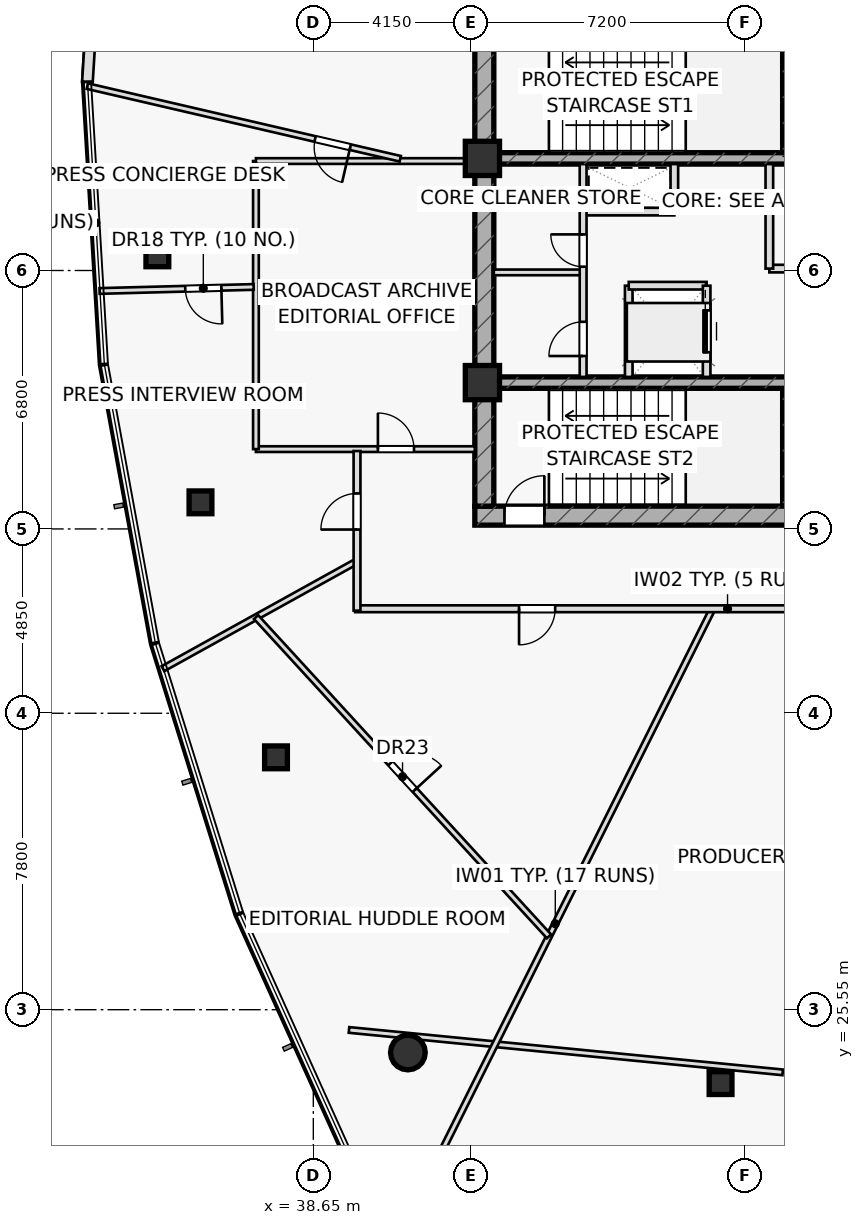
"""IFC4 building model, lengths in metres.
Left out: names, types, materials, properties, quantities, classifications, styles, units other than length and angle.
Written with IfcOpenShell. Run it as: python <this file> out.ifc"""

import sys

from ifc_helpers import new_model, si_unit, direction, frame, frame_2d, origin, origin_2d, place, context, subcontext, project, spatial, rectangle, hollow_rectangle, hollow_circle, extrude, element, fill, save


model = new_model("IFC4")
c1 = context("Model", 3, precision=1e-05, world=origin(), true_north=direction((0.0, 1.0)))
c2 = subcontext(c1, "Body", "Model", "MODEL_VIEW")
j1 = project(units=[si_unit("LENGTHUNIT", "METRE"), si_unit("PLANEANGLEUNIT", "RADIAN")], contexts=[c1])
p1 = place(None, origin())
s1 = spatial("IfcSite", under=j1, at=p1, CompositionType="ELEMENT")
p2 = place(p1, origin())
s2 = spatial("IfcBuilding", under=s1, at=p2, CompositionType="ELEMENT")
p3 = place(p2, frame((0.0, 0.0, 188.75)))
s3 = spatial("IfcBuildingStorey", under=s2, at=p3, CompositionType="ELEMENT", Elevation=188.75)
for number, where, z_axis, x_axis in (
    (1, (51.11, 48.1, 0.0), (0.0, 0.0, 1.0), (0.0, 1.0, 0.0)),
    (2, (51.11, 38.8, 0.0), (0.0, 0.0, 1.0), (0.0, 1.0, 0.0)),
):
    element("IfcWall", number, at=place(p3, frame(where, z_axis=z_axis, x_axis=x_axis)), inside=s3, PredefinedType="SHEAR", context=c2, shape_type="SweptSolid", body=[
        extrude(rectangle(XDim=3.1, YDim=0.22, at=frame_2d((1.55, 0.0))), origin(), (0.0, 0.0, 1.0), 3.55),
    ])
p4 = place(p3, frame((42.9, 38.55, 0.0), z_axis=(0.0, 0.0, 1.0), x_axis=(1.0, 0.0, 0.0)))
e3 = element("IfcWall", 3, at=p4, inside=s3, PredefinedType="SHEAR", context=c2, shape_type="SweptSolid", body=[
    extrude(rectangle(XDim=14.2, YDim=0.5, at=frame_2d((7.1, 0.0))), origin(), (0.0, 0.0, 1.0), 3.55),
])
p5 = place(p4, frame((0.78, 0.0, 0.0)))
e4 = element("IfcOpeningElement", 4, at=p5, cuts=e3, PredefinedType="OPENING", context=c2, shape_type="SweptSolid", body=[
    extrude(rectangle(XDim=1.05, YDim=2.2, at=frame_2d((0.525, 1.1))), frame((0.0, 0.26, 0.0), z_axis=(0.0, -1.0, 0.0), x_axis=(1.0, 0.0, 0.0)), (0.0, 0.0, 1.0), 0.52),
])
p6 = place(p3, frame((43.15, 38.8, 0.0), z_axis=(0.0, 0.0, 1.0), x_axis=(0.0, 1.0, 0.0)))
e5 = element("IfcWall", 5, at=p6, inside=s3, PredefinedType="SHEAR", context=c2, shape_type="SweptSolid", body=[
    extrude(rectangle(XDim=12.4, YDim=0.5, at=frame_2d((6.2, 0.0))), origin(), (0.0, 0.0, 1.0), 3.55),
])
p7 = place(p3, frame((43.4, 47.95, 0.0), z_axis=(0.0, 0.0, 1.0), x_axis=(1.0, 0.0, 0.0)))
e6 = element("IfcWall", 6, at=p7, inside=s3, PredefinedType="SHEAR", context=c2, shape_type="SweptSolid", body=[
    extrude(rectangle(XDim=13.2, YDim=0.3, at=frame_2d((6.6, 0.0))), origin(), (0.0, 0.0, 1.0), 3.55),
])
p8 = place(p7, frame((8.345, 0.0, 0.0)))
e7 = element("IfcOpeningElement", 7, at=p8, cuts=e6, PredefinedType="OPENING", context=c2, shape_type="SweptSolid", body=[
    extrude(rectangle(XDim=1.15, YDim=2.2, at=frame_2d((0.575, 1.1))), frame((0.0, 0.16, 0.0), z_axis=(0.0, -1.0, 0.0), x_axis=(1.0, 0.0, 0.0)), (0.0, 0.0, 1.0), 0.32),
])
p9 = place(p7, frame((10.065, 0.0, 0.0)))
e8 = element("IfcOpeningElement", 8, at=p9, cuts=e6, PredefinedType="OPENING", context=c2, shape_type="SweptSolid", body=[
    extrude(rectangle(XDim=1.15, YDim=2.2, at=frame_2d((0.575, 1.1))), frame((0.0, 0.16, 0.0), z_axis=(0.0, -1.0, 0.0), x_axis=(1.0, 0.0, 0.0)), (0.0, 0.0, 1.0), 0.32),
])
p10 = place(p7, frame((11.645, 0.0, 0.0)))
e9 = element("IfcOpeningElement", 9, at=p10, cuts=e6, PredefinedType="OPENING", context=c2, shape_type="SweptSolid", body=[
    extrude(rectangle(XDim=1.15, YDim=2.2, at=frame_2d((0.575, 1.1))), frame((0.0, 0.16, 0.0), z_axis=(0.0, -1.0, 0.0), x_axis=(1.0, 0.0, 0.0)), (0.0, 0.0, 1.0), 0.32),
])
p11 = place(p3, frame((43.4, 42.05, 0.0), z_axis=(0.0, 0.0, 1.0), x_axis=(1.0, 0.0, 0.0)))
e10 = element("IfcWall", 10, at=p11, inside=s3, PredefinedType="SHEAR", context=c2, shape_type="SweptSolid", body=[
    extrude(rectangle(XDim=13.2, YDim=0.3, at=frame_2d((6.6, 0.0))), origin(), (0.0, 0.0, 1.0), 3.55),
])
p12 = place(p11, frame((8.37, 0.0, 0.0)))
e11 = element("IfcOpeningElement", 11, at=p12, cuts=e10, PredefinedType="OPENING", context=c2, shape_type="SweptSolid", body=[
    extrude(rectangle(XDim=1.1, YDim=2.15, at=frame_2d((0.55, 1.075))), frame((0.0, 0.16, 0.0), z_axis=(0.0, -1.0, 0.0), x_axis=(1.0, 0.0, 0.0)), (0.0, 0.0, 1.0), 0.32),
])
p13 = place(p11, frame((10.09, 0.0, 0.0)))
e12 = element("IfcOpeningElement", 12, at=p13, cuts=e10, PredefinedType="OPENING", context=c2, shape_type="SweptSolid", body=[
    extrude(rectangle(XDim=1.1, YDim=2.15, at=frame_2d((0.55, 1.075))), frame((0.0, 0.16, 0.0), z_axis=(0.0, -1.0, 0.0), x_axis=(1.0, 0.0, 0.0)), (0.0, 0.0, 1.0), 0.32),
])
p14 = place(p11, frame((11.83, 0.0, 0.0)))
e13 = element("IfcOpeningElement", 13, at=p14, cuts=e10, PredefinedType="OPENING", context=c2, shape_type="SweptSolid", body=[
    extrude(rectangle(XDim=1.1, YDim=2.15, at=frame_2d((0.55, 1.075))), frame((0.0, 0.16, 0.0), z_axis=(0.0, -1.0, 0.0), x_axis=(1.0, 0.0, 0.0)), (0.0, 0.0, 1.0), 0.32),
])
for number, where, z_axis, x_axis in (
    (14, (43.1, 47.95, 0.0), (0.0, 0.0, 1.0), (1.0, 0.0, 0.0)),
    (15, (43.1, 42.05, 0.0), (0.0, 0.0, 1.0), (1.0, 0.0, 0.0)),
):
    element("IfcColumn", number, at=place(p3, frame(where, z_axis=z_axis, x_axis=x_axis)), inside=s3, PredefinedType="COLUMN", context=c2, shape_type="SweptSolid", body=[
        extrude(rectangle(XDim=0.9, YDim=0.9, at=origin_2d()), origin(), (0.0, 0.0, 1.0), 3.55),
    ])
for number, where, z_axis, x_axis in (
    (16, (34.546, 45.399, 0.0), (0.0, 0.0, 1.0), (1.0, 0.0, 0.0)),
    (17, (35.681, 38.9, 0.0), (0.0, 0.0, 1.0), (1.0, 0.0, 0.0)),
    (18, (37.668, 32.19, 0.0), (0.0, 0.0, 1.0), (1.0, 0.0, 0.0)),
):
    element("IfcColumn", number, at=place(p3, frame(where, z_axis=z_axis, x_axis=x_axis)), inside=s3, PredefinedType="COLUMN", context=c2, shape_type="SweptSolid", body=[
        extrude(hollow_rectangle(XDim=0.6, YDim=0.6, WallThickness=0.036, at=origin_2d()), origin(), (0.0, 0.0, 1.0), 3.55),
    ])
p15 = place(p3, frame((41.139, 24.424, 0.0), z_axis=(0.0, 0.0, 1.0), x_axis=(1.0, 0.0, 0.0)))
e19 = element("IfcColumn", 19, at=p15, inside=s3, PredefinedType="COLUMN", context=c2, shape_type="SweptSolid", body=[
    extrude(hollow_circle(Radius=0.457, WallThickness=0.04, at=origin_2d()), origin(), (0.0, 0.0, 1.0), 3.55),
])
p16 = place(p3, frame((49.366, 23.619, 0.0), z_axis=(0.0, 0.0, 1.0), x_axis=(1.0, 0.0, 0.0)))
e20 = element("IfcColumn", 20, at=p16, inside=s3, PredefinedType="COLUMN", context=c2, shape_type="SweptSolid", body=[
    extrude(hollow_rectangle(XDim=0.6, YDim=0.6, WallThickness=0.036, at=origin_2d()), origin(), (0.0, 0.0, 1.0), 3.55),
])
p17 = place(p3, frame((45.75, 46.55, 0.0), z_axis=(0.0, 0.0, 1.0), x_axis=(1.0, 0.0, 0.0)))
e21 = element("IfcWall", 21, at=p17, inside=s3, PredefinedType="PARTITIONING", context=c2, shape_type="SweptSolid", body=[
    extrude(rectangle(XDim=2.4, YDim=0.2, at=frame_2d((1.2, 0.0))), origin(), (0.0, 0.0, 1.0), 3.55),
])
p18 = place(p3, frame((48.15, 46.55, 0.0), z_axis=(0.0, 0.0, 1.0), x_axis=(0.0, 1.0, 0.0)))
e22 = element("IfcWall", 22, at=p18, inside=s3, PredefinedType="PARTITIONING", context=c2, shape_type="SweptSolid", body=[
    extrude(rectangle(XDim=1.25, YDim=0.2, at=frame_2d((0.625, 0.0))), origin(), (0.0, 0.0, 1.0), 3.55),
])
p19 = place(p3, frame((46.95, 42.2, 0.0), z_axis=(0.0, 0.0, 1.0), x_axis=(0.0, 1.0, 0.0)))
e23 = element("IfcWall", 23, at=p19, inside=s3, PredefinedType="PARTITIONING", context=c2, shape_type="SweptSolid", body=[
    extrude(rectangle(XDim=2.4, YDim=0.2, at=frame_2d((1.2, 0.0))), origin(), (0.0, 0.0, 1.0), 3.55),
])
p20 = place(p3, frame((46.95, 44.6, 0.0), z_axis=(0.0, 0.0, 1.0), x_axis=(1.0, 0.0, 0.0)))
e24 = element("IfcWall", 24, at=p20, inside=s3, PredefinedType="PARTITIONING", context=c2, shape_type="SweptSolid", body=[
    extrude(rectangle(XDim=2.05, YDim=0.2, at=frame_2d((1.025, 0.0))), origin(), (0.0, 0.0, 1.0), 3.55),
])
p21 = place(p3, frame((50.65, 45.05, 0.0), z_axis=(0.0, 0.0, 1.0), x_axis=(1.0, 0.0, 0.0)))
e25 = element("IfcWall", 25, at=p21, inside=s3, PredefinedType="PARTITIONING", context=c2, shape_type="SweptSolid", body=[
    extrude(rectangle(XDim=5.95, YDim=0.2, at=frame_2d((2.975, 0.0))), origin(), (0.0, 0.0, 1.0), 3.55),
])
p22 = place(p21, frame((1.35, 0.0, 0.0)))
e26 = element("IfcOpeningElement", 26, at=p22, cuts=e25, PredefinedType="OPENING", context=c2, shape_type="SweptSolid", body=[
    extrude(rectangle(XDim=1.5, YDim=2.2, at=frame_2d((0.75, 1.1))), frame((0.0, 0.11, 0.0), z_axis=(0.0, -1.0, 0.0), x_axis=(1.0, 0.0, 0.0)), (0.0, 0.0, 1.0), 0.22),
])
p23 = place(p3, frame((50.65, 45.05, 0.0), z_axis=(0.0, 0.0, 1.0), x_axis=(0.0, 1.0, 0.0)))
e27 = element("IfcWall", 27, at=p23, inside=s3, PredefinedType="PARTITIONING", context=c2, shape_type="SweptSolid", body=[
    extrude(rectangle(XDim=2.75, YDim=0.2, at=frame_2d((1.375, 0.0))), origin(), (0.0, 0.0, 1.0), 3.55),
])
p24 = place(p3, frame((43.4, 44.95, 0.0), z_axis=(0.0, 0.0, 1.0), x_axis=(1.0, 0.0, 0.0)))
e28 = element("IfcWall", 28, at=p24, inside=s3, PredefinedType="PARTITIONING", context=c2, shape_type="SweptSolid", body=[
    extrude(rectangle(XDim=2.35, YDim=0.15, at=frame_2d((1.175, 0.0))), origin(), (0.0, 0.0, 1.0), 3.55),
])
p25 = place(p3, frame((45.75, 42.2, 0.0), z_axis=(0.0, 0.0, 1.0), x_axis=(0.0, 1.0, 0.0)))
e29 = element("IfcWall", 29, at=p25, inside=s3, PredefinedType="PARTITIONING", context=c2, shape_type="SweptSolid", body=[
    extrude(rectangle(XDim=5.6, YDim=0.18, at=frame_2d((2.8, 0.0))), origin(), (0.0, 0.0, 1.0), 3.55),
])
p26 = place(p25, frame((0.55, 0.0, 0.0)))
e30 = element("IfcOpeningElement", 30, at=p26, cuts=e29, PredefinedType="OPENING", context=c2, shape_type="SweptSolid", body=[
    extrude(rectangle(XDim=0.9, YDim=2.05, at=frame_2d((0.45, 1.025))), frame((0.0, 0.1, 0.0), z_axis=(0.0, -1.0, 0.0), x_axis=(1.0, 0.0, 0.0)), (0.0, 0.0, 1.0), 0.2),
])
p27 = place(p25, frame((2.9, 0.0, 0.0)))
e31 = element("IfcOpeningElement", 31, at=p27, cuts=e29, PredefinedType="OPENING", context=c2, shape_type="SweptSolid", body=[
    extrude(rectangle(XDim=0.85, YDim=2.05, at=frame_2d((0.425, 1.025))), frame((0.0, 0.1, 0.0), z_axis=(0.0, -1.0, 0.0), x_axis=(1.0, 0.0, 0.0)), (0.0, 0.0, 1.0), 0.2),
])
p28 = place(p3, frame((39.589, 25.018, 0.0), z_axis=(0.0, 0.0, 1.0), x_axis=(0.99524905582, -0.097361783517, 0.0)))
e32 = element("IfcWall", 32, at=p28, inside=s3, PredefinedType="PARTITIONING", context=c2, shape_type="SweptSolid", body=[
    extrude(rectangle(XDim=11.467, YDim=0.15, at=frame_2d((5.733, 0.0))), origin(), (0.0, 0.0, 1.0), 2.935),
])
p29 = place(p3, frame((37.14, 40.3, 0.0), z_axis=(0.0, 0.0, 1.0), x_axis=(1.0, 0.0, 0.0)))
e33 = element("IfcWall", 33, at=p29, inside=s3, PredefinedType="PARTITIONING", context=c2, shape_type="SweptSolid", body=[
    extrude(rectangle(XDim=5.76, YDim=0.15, at=frame_2d((2.88, 0.0))), origin(), (0.0, 0.0, 1.0), 3.55),
])
p30 = place(p29, frame((3.21, 0.0, 0.0)))
e34 = element("IfcOpeningElement", 34, at=p30, cuts=e33, PredefinedType="OPENING", context=c2, shape_type="SweptSolid", body=[
    extrude(rectangle(XDim=0.95, YDim=2.05, at=frame_2d((0.475, 1.025))), frame((0.0, 0.085, 0.0), z_axis=(0.0, -1.0, 0.0), x_axis=(1.0, 0.0, 0.0)), (0.0, 0.0, 1.0), 0.17),
])
p31 = place(p3, frame((37.14, 40.3, 0.0), z_axis=(0.0, 0.0, 1.0), x_axis=(0.0, 1.0, 0.0)))
e35 = element("IfcWall", 35, at=p31, inside=s3, PredefinedType="PARTITIONING", context=c2, shape_type="SweptSolid", body=[
    extrude(rectangle(XDim=7.58, YDim=0.15, at=frame_2d((3.79, 0.0))), origin(), (0.0, 0.0, 1.0), 2.935),
])
p32 = place(p3, frame((37.14, 47.88, 0.0), z_axis=(0.0, 0.0, 1.0), x_axis=(1.0, 0.0, 0.0)))
e36 = element("IfcWall", 36, at=p32, inside=s3, PredefinedType="PARTITIONING", context=c2, shape_type="SweptSolid", body=[
    extrude(rectangle(XDim=5.76, YDim=0.15, at=frame_2d((2.88, 0.0))), origin(), (0.0, 0.0, 1.0), 2.935),
])
p33 = place(p3, frame((37.08, 44.567, 0.0), z_axis=(0.0, 0.0, 1.0), x_axis=(-0.999657078265, -0.026186368123, 0.0)))
e37 = element("IfcWall", 37, at=p33, inside=s3, PredefinedType="PARTITIONING", context=c2, shape_type="SweptSolid", body=[
    extrude(rectangle(XDim=4.056, YDim=0.15, at=frame_2d((2.028, 0.0))), origin(), (0.0, 0.0, 1.0), 3.025),
])
p34 = place(p33, frame((0.85, 0.0, 0.0)))
e38 = element("IfcOpeningElement", 38, at=p34, cuts=e37, PredefinedType="OPENING", context=c2, shape_type="SweptSolid", body=[
    extrude(rectangle(XDim=0.95, YDim=2.05, at=frame_2d((0.475, 1.025))), frame((0.0, 0.085, 0.0), z_axis=(0.0, -1.0, 0.0), x_axis=(1.0, 0.0, 0.0)), (0.0, 0.0, 1.0), 0.17),
])
p35 = place(p3, frame((39.8, 37.352, 0.0), z_axis=(0.0, 0.0, 1.0), x_axis=(-0.874673544056, -0.484712483158, 0.0)))
e39 = element("IfcWall", 39, at=p35, inside=s3, PredefinedType="PARTITIONING", context=c2, shape_type="SweptSolid", body=[
    extrude(rectangle(XDim=5.839, YDim=0.15, at=frame_2d((2.919, 0.0))), origin(), (0.0, 0.0, 1.0), 3.025),
])
p36 = place(p3, frame((49.156, 36.1, 0.0), z_axis=(0.0, 0.0, 1.0), x_axis=(-0.446733908908, -0.894666873552, 0.0)))
e40 = element("IfcWall", 40, at=p36, inside=s3, PredefinedType="PARTITIONING", context=c2, shape_type="SweptSolid", body=[
    extrude(rectangle(XDim=18.529, YDim=0.15, at=frame_2d((9.264, 0.0))), origin(), (0.0, 0.0, 1.0), 2.935),
])
p37 = place(p3, frame((40.937, 47.94, 0.0), z_axis=(0.0, 0.0, 1.0), x_axis=(-0.974086065595, 0.226177666479, 0.0)))
e41 = element("IfcWall", 41, at=p37, inside=s3, PredefinedType="PARTITIONING", context=c2, shape_type="SweptSolid", body=[
    extrude(rectangle(XDim=8.453, YDim=0.15, at=frame_2d((4.227, 0.0))), origin(), (0.0, 0.0, 1.0), 2.935),
])
p38 = place(p37, frame((1.35, 0.0, 0.0)))
e42 = element("IfcOpeningElement", 42, at=p38, cuts=e41, PredefinedType="OPENING", context=c2, shape_type="SweptSolid", body=[
    extrude(rectangle(XDim=0.95, YDim=2.05, at=frame_2d((0.475, 1.025))), frame((0.0, 0.085, 0.0), z_axis=(0.0, -1.0, 0.0), x_axis=(1.0, 0.0, 0.0)), (0.0, 0.0, 1.0), 0.17),
])
p39 = place(p3, frame((37.144, 35.881, 0.0), z_axis=(0.0, 0.0, 1.0), x_axis=(0.676055232475, -0.736850950086, 0.0)))
e43 = element("IfcWall", 43, at=p39, inside=s3, PredefinedType="PARTITIONING", context=c2, shape_type="SweptSolid", body=[
    extrude(rectangle(XDim=11.401, YDim=0.15, at=frame_2d((5.7, 0.0))), origin(), (0.0, 0.0, 1.0), 2.935),
])
p40 = place(p39, frame((5.225, 0.0, 0.0)))
e44 = element("IfcOpeningElement", 44, at=p40, cuts=e43, PredefinedType="OPENING", context=c2, shape_type="SweptSolid", body=[
    extrude(rectangle(XDim=0.95, YDim=2.05, at=frame_2d((0.475, 1.025))), frame((0.0, 0.085, 0.0), z_axis=(0.0, -1.0, 0.0), x_axis=(1.0, 0.0, 0.0)), (0.0, 0.0, 1.0), 0.17),
])
p41 = place(p3, frame((59.35, 36.1, 0.0), z_axis=(0.0, 0.0, 1.0), x_axis=(-1.0, 0.0, 0.0)))
e45 = element("IfcWall", 45, at=p41, inside=s3, PredefinedType="PARTITIONING", context=c2, shape_type="SweptSolid", body=[
    extrude(rectangle(XDim=19.6, YDim=0.18, at=frame_2d((9.8, 0.0))), origin(), (0.0, 0.0, 1.0), 2.935),
])
p42 = place(p41, frame((1.042, 0.0, 0.0)))
e46 = element("IfcOpeningElement", 46, at=p42, cuts=e45, PredefinedType="OPENING", context=c2, shape_type="SweptSolid", body=[
    extrude(rectangle(XDim=0.95, YDim=2.05, at=frame_2d((0.475, 1.025))), frame((0.0, 0.1, 0.0), z_axis=(0.0, -1.0, 0.0), x_axis=(1.0, 0.0, 0.0)), (0.0, 0.0, 1.0), 0.2),
])
p43 = place(p41, frame((6.048, 0.0, 0.0)))
e47 = element("IfcOpeningElement", 47, at=p43, cuts=e45, PredefinedType="OPENING", context=c2, shape_type="SweptSolid", body=[
    extrude(rectangle(XDim=0.95, YDim=2.05, at=frame_2d((0.475, 1.025))), frame((0.0, 0.1, 0.0), z_axis=(0.0, -1.0, 0.0), x_axis=(1.0, 0.0, 0.0)), (0.0, 0.0, 1.0), 0.2),
])
p44 = place(p41, frame((14.336, 0.0, 0.0)))
e48 = element("IfcOpeningElement", 48, at=p44, cuts=e45, PredefinedType="OPENING", context=c2, shape_type="SweptSolid", body=[
    extrude(rectangle(XDim=0.95, YDim=2.05, at=frame_2d((0.475, 1.025))), frame((0.0, 0.1, 0.0), z_axis=(0.0, -1.0, 0.0), x_axis=(1.0, 0.0, 0.0)), (0.0, 0.0, 1.0), 0.2),
])
p45 = place(p3, frame((39.8, 36.05, 0.0), z_axis=(0.0, 0.0, 1.0), x_axis=(0.0, 1.0, 0.0)))
e49 = element("IfcWall", 49, at=p45, inside=s3, PredefinedType="PARTITIONING", context=c2, shape_type="SweptSolid", body=[
    extrude(rectangle(XDim=4.2, YDim=0.18, at=frame_2d((2.1, 0.0))), origin(), (0.0, 0.0, 1.0), 2.935),
])
p46 = place(p45, frame((2.134, 0.0, 0.0)))
e50 = element("IfcOpeningElement", 50, at=p46, cuts=e49, PredefinedType="OPENING", context=c2, shape_type="SweptSolid", body=[
    extrude(rectangle(XDim=0.95, YDim=2.05, at=frame_2d((0.475, 1.025))), frame((0.0, 0.1, 0.0), z_axis=(0.0, -1.0, 0.0), x_axis=(1.0, 0.0, 0.0)), (0.0, 0.0, 1.0), 0.2),
])
p47 = place(p3, frame((33.166, 57.42, 0.0), z_axis=(0.0, 0.0, 1.0), x_axis=(-0.061489369983, -0.998107738363, 0.0)))
e51 = element("IfcWall", 51, at=p47, inside=s3, PredefinedType="STANDARD", context=c2, shape_type="SweptSolid", body=[
    extrude(rectangle(XDim=7.472, YDim=0.28, at=frame_2d((3.736, 0.0))), origin(), (0.0, 0.0, 1.0), 3.55),
])
p48 = place(p3, frame((49.0, 42.2, 0.0), z_axis=(0.0, 0.0, 1.0), x_axis=(0.0, 1.0, 0.0)))
e52 = element("IfcWall", 52, at=p48, inside=s3, PredefinedType="PARTITIONING", context=c2, shape_type="SweptSolid", body=[
    extrude(rectangle(XDim=2.4, YDim=0.2, at=frame_2d((1.2, 0.0))), origin(), (0.0, 0.0, 1.0), 3.55),
])
p49 = place(p48, frame((0.65, 0.0, 0.0)))
e53 = element("IfcOpeningElement", 53, at=p49, cuts=e52, PredefinedType="OPENING", context=c2, shape_type="SweptSolid", body=[
    extrude(rectangle(XDim=1.1, YDim=2.15, at=frame_2d((0.55, 1.075))), frame((0.0, 0.11, 0.0), z_axis=(0.0, -1.0, 0.0), x_axis=(1.0, 0.0, 0.0)), (0.0, 0.0, 1.0), 0.22),
])
p50 = place(p5, origin())
e54 = element("IfcDoor", 54, at=p50, inside=s3, OperationType="SINGLE_SWING_RIGHT", PredefinedType="DOOR", context=c2, shape_type="SweptSolid", body=[
    extrude(rectangle(XDim=1.05, YDim=2.2, at=frame_2d((0.525, 1.1))), frame((0.0, 0.025, 0.0), z_axis=(0.0, -1.0, 0.0), x_axis=(1.0, 0.0, 0.0)), (0.0, 0.0, 1.0), 0.05),
])
fill(e4, e54)
p51 = place(p26, origin())
e55 = element("IfcDoor", 55, at=p51, inside=s3, OperationType="SINGLE_SWING_LEFT", PredefinedType="DOOR", context=c2, shape_type="SweptSolid", body=[
    extrude(rectangle(XDim=0.9, YDim=2.05, at=frame_2d((0.45, 1.025))), frame((0.0, 0.025, 0.0), z_axis=(0.0, -1.0, 0.0), x_axis=(1.0, 0.0, 0.0)), (0.0, 0.0, 1.0), 0.05),
])
fill(e30, e55)
p52 = place(p27, origin())
e56 = element("IfcDoor", 56, at=p52, inside=s3, OperationType="SINGLE_SWING_RIGHT", PredefinedType="DOOR", context=c2, shape_type="SweptSolid", body=[
    extrude(rectangle(XDim=0.85, YDim=2.05, at=frame_2d((0.425, 1.025))), frame((0.0, 0.025, 0.0), z_axis=(0.0, -1.0, 0.0), x_axis=(1.0, 0.0, 0.0)), (0.0, 0.0, 1.0), 0.05),
])
fill(e31, e56)
p53 = place(p30, origin())
e57 = element("IfcDoor", 57, at=p53, inside=s3, OperationType="SINGLE_SWING_LEFT", PredefinedType="DOOR", context=c2, shape_type="SweptSolid", body=[
    extrude(rectangle(XDim=0.95, YDim=2.05, at=frame_2d((0.475, 1.025))), frame((0.0, 0.025, 0.0), z_axis=(0.0, -1.0, 0.0), x_axis=(1.0, 0.0, 0.0)), (0.0, 0.0, 1.0), 0.05),
])
fill(e34, e57)
p54 = place(p34, origin())
e58 = element("IfcDoor", 58, at=p54, inside=s3, OperationType="SINGLE_SWING_LEFT", PredefinedType="DOOR", context=c2, shape_type="SweptSolid", body=[
    extrude(rectangle(XDim=0.95, YDim=2.05, at=frame_2d((0.475, 1.025))), frame((0.0, 0.025, 0.0), z_axis=(0.0, -1.0, 0.0), x_axis=(1.0, 0.0, 0.0)), (0.0, 0.0, 1.0), 0.05),
])
fill(e38, e58)
p55 = place(p38, origin())
e59 = element("IfcDoor", 59, at=p55, inside=s3, OperationType="SINGLE_SWING_LEFT", PredefinedType="DOOR", context=c2, shape_type="SweptSolid", body=[
    extrude(rectangle(XDim=0.95, YDim=2.05, at=frame_2d((0.475, 1.025))), frame((0.0, 0.025, 0.0), z_axis=(0.0, -1.0, 0.0), x_axis=(1.0, 0.0, 0.0)), (0.0, 0.0, 1.0), 0.05),
])
fill(e42, e59)
p56 = place(p40, origin())
e60 = element("IfcDoor", 60, at=p56, inside=s3, OperationType="SINGLE_SWING_RIGHT", PredefinedType="DOOR", context=c2, shape_type="SweptSolid", body=[
    extrude(rectangle(XDim=0.95, YDim=2.05, at=frame_2d((0.475, 1.025))), frame((0.0, 0.025, 0.0), z_axis=(0.0, -1.0, 0.0), x_axis=(1.0, 0.0, 0.0)), (0.0, 0.0, 1.0), 0.05),
])
fill(e44, e60)
p57 = place(p44, origin())
e61 = element("IfcDoor", 61, at=p57, inside=s3, OperationType="SINGLE_SWING_RIGHT", PredefinedType="DOOR", context=c2, shape_type="SweptSolid", body=[
    extrude(rectangle(XDim=0.95, YDim=2.05, at=frame_2d((0.475, 1.025))), frame((0.0, 0.025, 0.0), z_axis=(0.0, -1.0, 0.0), x_axis=(1.0, 0.0, 0.0)), (0.0, 0.0, 1.0), 0.05),
])
fill(e48, e61)
p58 = place(p46, origin())
e62 = element("IfcDoor", 62, at=p58, inside=s3, OperationType="SINGLE_SWING_LEFT", PredefinedType="DOOR", context=c2, shape_type="SweptSolid", body=[
    extrude(rectangle(XDim=0.95, YDim=2.05, at=frame_2d((0.475, 1.025))), frame((0.0, 0.025, 0.0), z_axis=(0.0, -1.0, 0.0), x_axis=(1.0, 0.0, 0.0)), (0.0, 0.0, 1.0), 0.05),
])
fill(e50, e62)
p59 = place(p49, origin())
e63 = element("IfcDoor", 63, at=p59, inside=s3, OperationType="SLIDING_TO_RIGHT", PredefinedType="DOOR", context=c2, shape_type="SweptSolid", body=[
    extrude(rectangle(XDim=1.1, YDim=2.15, at=frame_2d((0.55, 1.075))), frame((0.0, 0.025, 0.0), z_axis=(0.0, -1.0, 0.0), x_axis=(1.0, 0.0, 0.0)), (0.0, 0.0, 1.0), 0.05),
])
fill(e53, e63)
save(model, sys.argv[1])
